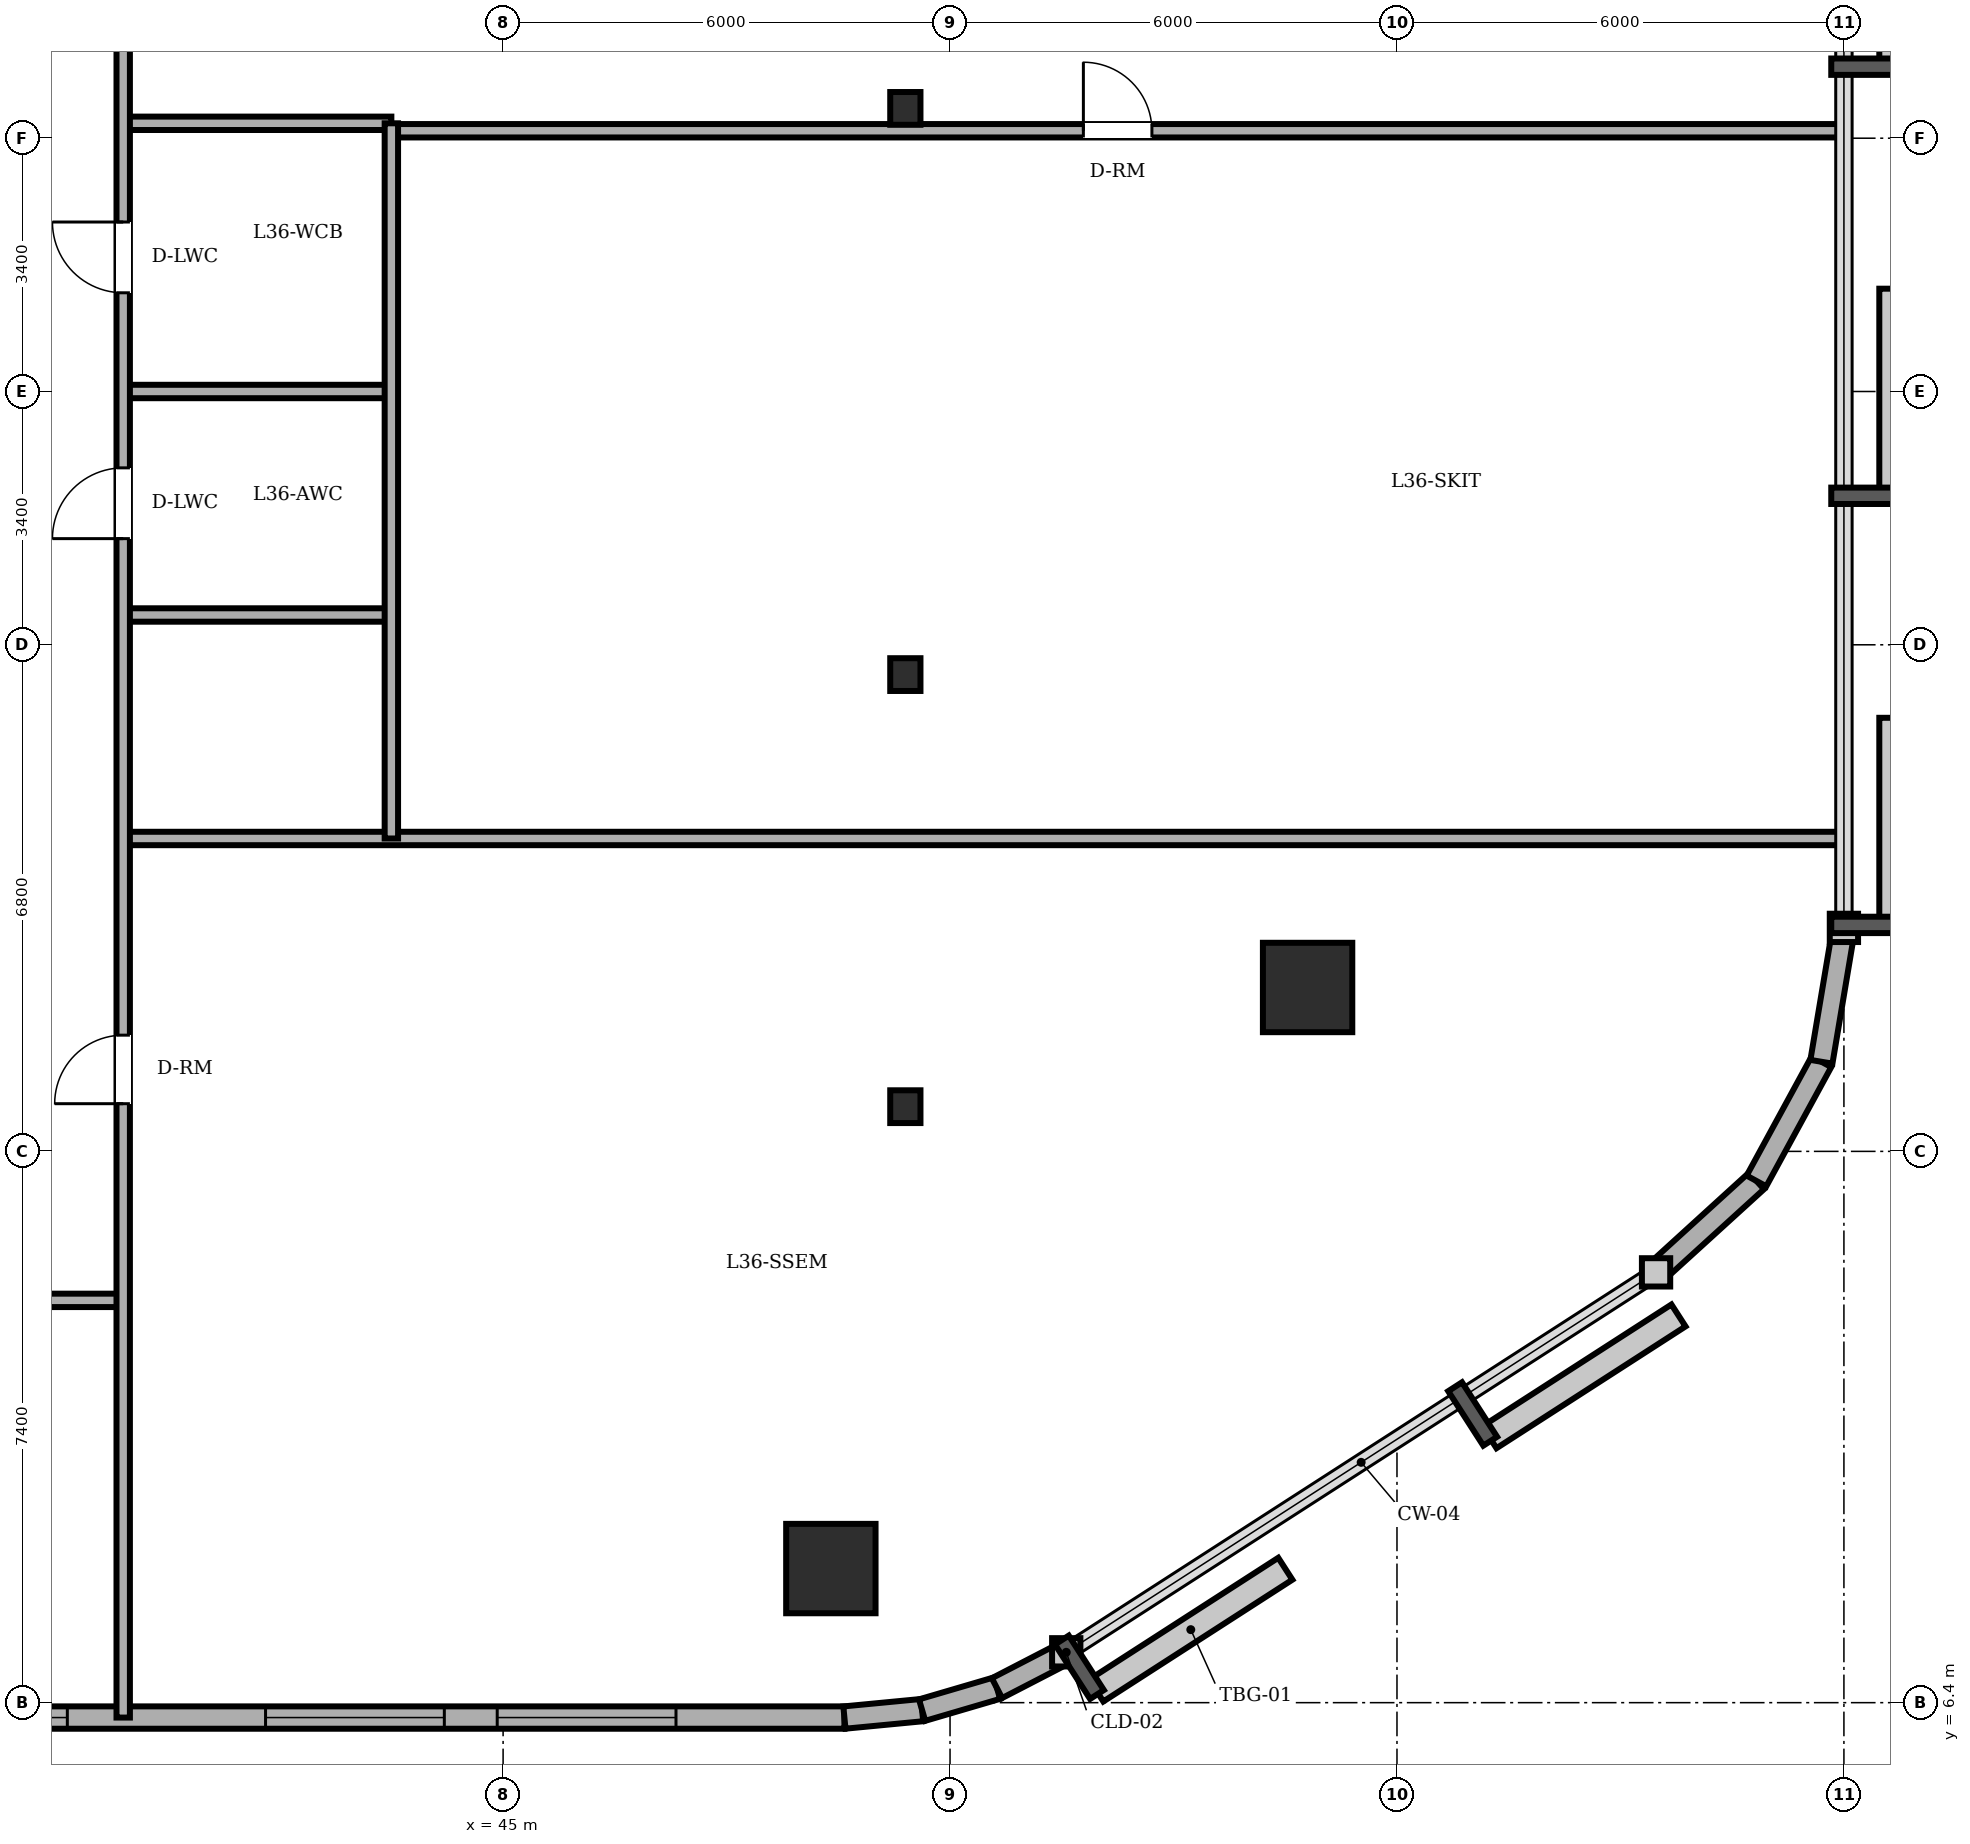
"""IFC4 building model, lengths in metres.
Left out: names, types, materials, properties, quantities, classifications, styles, units other than length and angle.
Written with IfcOpenShell. Run it as: python <this file> out.ifc"""

import sys

from ifc_helpers import new_model, si_unit, direction, frame, frame_2d, origin, origin_2d, place, context, subcontext, project, spatial, rectangle, circle, i_section, extrude, element, fill, save


model = new_model("IFC4")
c1 = context("Model", 3, precision=1e-05, world=origin(), true_north=direction((0.0, 1.0)))
c2 = subcontext(c1, "Body", "Model", "MODEL_VIEW")
j1 = project(units=[si_unit("LENGTHUNIT", "METRE"), si_unit("PLANEANGLEUNIT", "RADIAN")], contexts=[c1])
p1 = place(None, origin())
s1 = spatial("IfcSite", under=j1, at=p1, CompositionType="ELEMENT")
p2 = place(p1, origin())
s2 = spatial("IfcBuilding", under=s1, at=p2, CompositionType="ELEMENT")
p3 = place(p2, frame((0.0, 0.0, 138.7)))
s3 = spatial("IfcBuildingStorey", under=s2, at=p3, CompositionType="ELEMENT", Elevation=138.7)
for number, where, z_axis, x_axis in (
    (1, (49.4, 8.2, 0.0), (0.0, 0.0, 1.0), (1.0, 0.0, 0.0)),
    (2, (55.8, 16.0, 0.0), (0.0, 0.0, 1.0), (1.0, 0.0, 0.0)),
):
    element("IfcColumn", number, at=place(p3, frame(where, z_axis=z_axis, x_axis=x_axis)), inside=s3, PredefinedType="COLUMN", context=c2, shape_type="SweptSolid", body=[
        extrude(circle(Radius=0.6, at=origin_2d()), origin(), (0.0, 0.0, 1.0), 5.1),
    ])
for number, where, z_axis, x_axis in (
    (3, (50.4, 14.4, 0.0), (0.0, 0.0, 1.0), (1.0, 0.0, 0.0)),
    (4, (50.4, 20.2, 0.0), (0.0, 0.0, 1.0), (1.0, 0.0, 0.0)),
    (5, (50.4, 27.8, 0.0), (0.0, 0.0, 1.0), (1.0, 0.0, 0.0)),
):
    element("IfcColumn", number, at=place(p3, frame(where, z_axis=z_axis, x_axis=x_axis)), inside=s3, PredefinedType="COLUMN", context=c2, shape_type="SweptSolid", body=[
        extrude(i_section(OverallWidth=0.406, OverallDepth=0.44, WebThickness=0.024, FlangeThickness=0.039, FilletRadius=0.015, at=origin_2d()), origin(), (0.0, 0.0, 1.0), 5.1),
    ])
p4 = place(p3, frame((19.3, 6.2, 0.0), z_axis=(0.0, 0.0, 1.0), x_axis=(1.0, 0.0, 0.0)))
e6 = element("IfcWall", 6, at=p4, inside=s3, PredefinedType="SOLIDWALL", context=c2, shape_type="SweptSolid", body=[
    extrude(rectangle(XDim=30.282, YDim=0.3, at=frame_2d((15.141, 0.0))), origin(), (0.0, 0.0, 1.0), 4.9),
])
p5 = place(p4, frame((9.425, 0.0, 0.0)))
e7 = element("IfcOpeningElement", 7, at=p5, cuts=e6, PredefinedType="OPENING", context=c2, shape_type="SweptSolid", body=[
    extrude(rectangle(XDim=0.95, YDim=2.2, at=frame_2d((0.475, 1.1))), frame((0.0, 0.16, 0.0), z_axis=(0.0, -1.0, 0.0), x_axis=(1.0, 0.0, 0.0)), (0.0, 0.0, 1.0), 0.32),
])
p6 = place(p4, frame((0.825, 0.0, 0.85)))
e8 = element("IfcOpeningElement", 8, at=p6, cuts=e6, PredefinedType="OPENING", context=c2, shape_type="SweptSolid", body=[
    extrude(rectangle(XDim=2.4, YDim=2.1, at=frame_2d((1.2, 1.05))), frame((0.0, 0.16, 0.0), z_axis=(0.0, -1.0, 0.0), x_axis=(1.0, 0.0, 0.0)), (0.0, 0.0, 1.0), 0.32),
])
p7 = place(p4, frame((11.167, 0.0, 0.85)))
e9 = element("IfcOpeningElement", 9, at=p7, cuts=e6, PredefinedType="OPENING", context=c2, shape_type="SweptSolid", body=[
    extrude(rectangle(XDim=2.4, YDim=2.1, at=frame_2d((1.2, 1.05))), frame((0.0, 0.16, 0.0), z_axis=(0.0, -1.0, 0.0), x_axis=(1.0, 0.0, 0.0)), (0.0, 0.0, 1.0), 0.32),
])
p8 = place(p4, frame((17.45, 0.0, 0.85)))
e10 = element("IfcOpeningElement", 10, at=p8, cuts=e6, PredefinedType="OPENING", context=c2, shape_type="SweptSolid", body=[
    extrude(rectangle(XDim=2.4, YDim=2.1, at=frame_2d((1.2, 1.05))), frame((0.0, 0.16, 0.0), z_axis=(0.0, -1.0, 0.0), x_axis=(1.0, 0.0, 0.0)), (0.0, 0.0, 1.0), 0.32),
])
p9 = place(p4, frame((22.511, 0.0, 0.85)))
e11 = element("IfcOpeningElement", 11, at=p9, cuts=e6, PredefinedType="OPENING", context=c2, shape_type="SweptSolid", body=[
    extrude(rectangle(XDim=2.4, YDim=2.1, at=frame_2d((1.2, 1.05))), frame((0.0, 0.16, 0.0), z_axis=(0.0, -1.0, 0.0), x_axis=(1.0, 0.0, 0.0)), (0.0, 0.0, 1.0), 0.32),
])
p10 = place(p4, frame((25.621, 0.0, 0.85)))
e12 = element("IfcOpeningElement", 12, at=p10, cuts=e6, PredefinedType="OPENING", context=c2, shape_type="SweptSolid", body=[
    extrude(rectangle(XDim=2.4, YDim=2.1, at=frame_2d((1.2, 1.05))), frame((0.0, 0.16, 0.0), z_axis=(0.0, -1.0, 0.0), x_axis=(1.0, 0.0, 0.0)), (0.0, 0.0, 1.0), 0.32),
])
p11 = place(p3, frame((49.582, 6.2, 0.0), z_axis=(0.0, 0.0, 1.0), x_axis=(0.995426089968, 0.095534807324, 0.0)))
e13 = element("IfcWall", 13, at=p11, inside=s3, PredefinedType="SOLIDWALL", context=c2, shape_type="SweptSolid", body=[
    extrude(rectangle(XDim=1.048, YDim=0.3, at=frame_2d((0.524, 0.0))), origin(), (0.0, 0.0, 1.0), 4.9),
])
p12 = place(p3, frame((50.625, 6.3, 0.0), z_axis=(0.0, 0.0, 1.0), x_axis=(0.959528674476, 0.281610942363, 0.0)))
e14 = element("IfcWall", 14, at=p12, inside=s3, PredefinedType="SOLIDWALL", context=c2, shape_type="SweptSolid", body=[
    extrude(rectangle(XDim=1.047, YDim=0.3, at=frame_2d((0.524, 0.0))), origin(), (0.0, 0.0, 1.0), 4.9),
])
p13 = place(p3, frame((51.63, 6.595, 0.0), z_axis=(0.0, 0.0, 1.0), x_axis=(0.888283247196, 0.459296062198, 0.0)))
e15 = element("IfcWall", 15, at=p13, inside=s3, PredefinedType="SOLIDWALL", context=c2, shape_type="SweptSolid", body=[
    extrude(rectangle(XDim=1.047, YDim=0.3, at=frame_2d((0.523, 0.0))), origin(), (0.0, 0.0, 1.0), 4.9),
])
p14 = place(p3, frame((60.478, 12.176, 0.0), z_axis=(0.0, 0.0, 1.0), x_axis=(0.73947929393, 0.673179302897, 0.0)))
e16 = element("IfcWall", 16, at=p14, inside=s3, PredefinedType="SOLIDWALL", context=c2, shape_type="SweptSolid", body=[
    extrude(rectangle(XDim=1.823, YDim=0.3, at=frame_2d((0.911, 0.0))), origin(), (0.0, 0.0, 1.0), 4.9),
])
p15 = place(p3, frame((61.826, 13.403, 0.0), z_axis=(0.0, 0.0, 1.0), x_axis=(0.478608030646, 0.878028674362, 0.0)))
e17 = element("IfcWall", 17, at=p15, inside=s3, PredefinedType="SOLIDWALL", context=c2, shape_type="SweptSolid", body=[
    extrude(rectangle(XDim=1.822, YDim=0.3, at=frame_2d((0.911, 0.0))), origin(), (0.0, 0.0, 1.0), 4.9),
])
p16 = place(p3, frame((62.698, 15.003, 0.0), z_axis=(0.0, 0.0, 1.0), x_axis=(0.165724081207, 0.986172159873, 0.0)))
e18 = element("IfcWall", 18, at=p16, inside=s3, PredefinedType="SOLIDWALL", context=c2, shape_type="SweptSolid", body=[
    extrude(rectangle(XDim=1.822, YDim=0.3, at=frame_2d((0.911, 0.0))), origin(), (0.0, 0.0, 1.0), 4.9),
])
p17 = place(p3, frame((13.8, 11.8, 0.0), z_axis=(0.0, 0.0, 1.0), x_axis=(1.0, 0.0, 0.0)))
e19 = element("IfcWall", 19, at=p17, inside=s3, PredefinedType="PARTITIONING", context=c2, shape_type="SweptSolid", body=[
    extrude(rectangle(XDim=26.1, YDim=0.18, at=frame_2d((13.05, 0.0))), origin(), (0.0, 0.0, 1.0), 4.9),
])
p18 = place(p17, frame((15.25, 0.0, 0.0)))
e20 = element("IfcOpeningElement", 20, at=p18, cuts=e19, PredefinedType="OPENING", context=c2, shape_type="SweptSolid", body=[
    extrude(rectangle(XDim=0.9, YDim=2.05, at=frame_2d((0.45, 1.025))), frame((0.0, 0.1, 0.0), z_axis=(0.0, -1.0, 0.0), x_axis=(1.0, 0.0, 0.0)), (0.0, 0.0, 1.0), 0.2),
])
p19 = place(p3, frame((39.9, 18.0, 0.0), z_axis=(0.0, 0.0, 1.0), x_axis=(1.0, 0.0, 0.0)))
e21 = element("IfcWall", 21, at=p19, inside=s3, PredefinedType="PARTITIONING", context=c2, shape_type="SweptSolid", body=[
    extrude(rectangle(XDim=23.1, YDim=0.18, at=frame_2d((11.55, 0.0))), origin(), (0.0, 0.0, 1.0), 4.9),
])
p20 = place(p3, frame((39.9, 21.0, 0.0), z_axis=(0.0, 0.0, 1.0), x_axis=(1.0, 0.0, 0.0)))
e22 = element("IfcWall", 22, at=p20, inside=s3, PredefinedType="PARTITIONING", context=c2, shape_type="SweptSolid", body=[
    extrude(rectangle(XDim=3.6, YDim=0.18, at=frame_2d((1.8, 0.0))), origin(), (0.0, 0.0, 1.0), 4.9),
])
p21 = place(p3, frame((39.9, 24.0, 0.0), z_axis=(0.0, 0.0, 1.0), x_axis=(1.0, 0.0, 0.0)))
e23 = element("IfcWall", 23, at=p21, inside=s3, PredefinedType="PARTITIONING", context=c2, shape_type="SweptSolid", body=[
    extrude(rectangle(XDim=3.6, YDim=0.18, at=frame_2d((1.8, 0.0))), origin(), (0.0, 0.0, 1.0), 4.642),
])
p22 = place(p3, frame((43.5, 27.5, 0.0), z_axis=(0.0, 0.0, 1.0), x_axis=(1.0, 0.0, 0.0)))
e24 = element("IfcWall", 24, at=p22, inside=s3, PredefinedType="PARTITIONING", context=c2, shape_type="SweptSolid", body=[
    extrude(rectangle(XDim=19.5, YDim=0.18, at=frame_2d((9.75, 0.0))), origin(), (0.0, 0.0, 1.0), 4.432),
])
p23 = place(p22, frame((9.29, 0.0, 0.0)))
e25 = element("IfcOpeningElement", 25, at=p23, cuts=e24, PredefinedType="OPENING", context=c2, shape_type="SweptSolid", body=[
    extrude(rectangle(XDim=0.92, YDim=2.1, at=frame_2d((0.46, 1.05))), frame((0.0, 0.1, 0.0), z_axis=(0.0, -1.0, 0.0), x_axis=(1.0, 0.0, 0.0)), (0.0, 0.0, 1.0), 0.2),
])
p24 = place(p3, frame((39.9, 27.6, 0.0), z_axis=(0.0, 0.0, 1.0), x_axis=(1.0, 0.0, 0.0)))
e26 = element("IfcWall", 26, at=p24, inside=s3, PredefinedType="PARTITIONING", context=c2, shape_type="SweptSolid", body=[
    extrude(rectangle(XDim=3.6, YDim=0.18, at=frame_2d((1.8, 0.0))), origin(), (0.0, 0.0, 1.0), 4.432),
])
p25 = place(p3, frame((39.9, 6.2, 0.0), z_axis=(0.0, 0.0, 1.0), x_axis=(0.0, 1.0, 0.0)))
e27 = element("IfcWall", 27, at=p25, inside=s3, PredefinedType="PARTITIONING", context=c2, shape_type="SweptSolid", body=[
    extrude(rectangle(XDim=35.6, YDim=0.18, at=frame_2d((17.8, 0.0))), origin(), (0.0, 0.0, 1.0), 4.9),
])
p26 = place(p25, frame((15.825, 0.0, 0.0)))
e28 = element("IfcOpeningElement", 28, at=p26, cuts=e27, PredefinedType="OPENING", context=c2, shape_type="SweptSolid", body=[
    extrude(rectangle(XDim=0.95, YDim=2.15, at=frame_2d((0.475, 1.075))), frame((0.0, 0.1, 0.0), z_axis=(0.0, -1.0, 0.0), x_axis=(1.0, 0.0, 0.0)), (0.0, 0.0, 1.0), 0.2),
])
p27 = place(p25, frame((19.125, 0.0, 0.0)))
e29 = element("IfcOpeningElement", 29, at=p27, cuts=e27, PredefinedType="OPENING", context=c2, shape_type="SweptSolid", body=[
    extrude(rectangle(XDim=0.95, YDim=2.15, at=frame_2d((0.475, 1.075))), frame((0.0, 0.1, 0.0), z_axis=(0.0, -1.0, 0.0), x_axis=(1.0, 0.0, 0.0)), (0.0, 0.0, 1.0), 0.2),
])
p28 = place(p25, frame((25.24, 0.0, 0.0)))
e30 = element("IfcOpeningElement", 30, at=p28, cuts=e27, PredefinedType="OPENING", context=c2, shape_type="SweptSolid", body=[
    extrude(rectangle(XDim=0.92, YDim=2.1, at=frame_2d((0.46, 1.05))), frame((0.0, 0.1, 0.0), z_axis=(0.0, -1.0, 0.0), x_axis=(1.0, 0.0, 0.0)), (0.0, 0.0, 1.0), 0.2),
])
p29 = place(p25, frame((8.24, 0.0, 0.0)))
e31 = element("IfcOpeningElement", 31, at=p29, cuts=e27, PredefinedType="OPENING", context=c2, shape_type="SweptSolid", body=[
    extrude(rectangle(XDim=0.92, YDim=2.1, at=frame_2d((0.46, 1.05))), frame((0.0, 0.1, 0.0), z_axis=(0.0, -1.0, 0.0), x_axis=(1.0, 0.0, 0.0)), (0.0, 0.0, 1.0), 0.2),
])
p30 = place(p3, frame((43.5, 18.0, 0.0), z_axis=(0.0, 0.0, 1.0), x_axis=(0.0, 1.0, 0.0)))
e32 = element("IfcWall", 32, at=p30, inside=s3, PredefinedType="PARTITIONING", context=c2, shape_type="SweptSolid", body=[
    extrude(rectangle(XDim=9.6, YDim=0.18, at=frame_2d((4.8, 0.0))), origin(), (0.0, 0.0, 1.0), 4.9),
])
p31 = place(p8, origin())
e33 = element("IfcWindow", 33, at=p31, inside=s3, PartitioningType="TRIPLE_PANEL_VERTICAL", PredefinedType="WINDOW", context=c2, shape_type="SweptSolid", body=[
    extrude(rectangle(XDim=2.4, YDim=2.1, at=frame_2d((1.2, 1.05))), frame((0.0, 0.03, 0.0), z_axis=(0.0, -1.0, 0.0), x_axis=(1.0, 0.0, 0.0)), (0.0, 0.0, 1.0), 0.06),
])
fill(e10, e33)
p32 = place(p9, origin())
e34 = element("IfcWindow", 34, at=p32, inside=s3, PartitioningType="TRIPLE_PANEL_VERTICAL", PredefinedType="WINDOW", context=c2, shape_type="SweptSolid", body=[
    extrude(rectangle(XDim=2.4, YDim=2.1, at=frame_2d((1.2, 1.05))), frame((0.0, 0.03, 0.0), z_axis=(0.0, -1.0, 0.0), x_axis=(1.0, 0.0, 0.0)), (0.0, 0.0, 1.0), 0.06),
])
fill(e11, e34)
p33 = place(p10, origin())
e35 = element("IfcWindow", 35, at=p33, inside=s3, PartitioningType="TRIPLE_PANEL_VERTICAL", PredefinedType="WINDOW", context=c2, shape_type="SweptSolid", body=[
    extrude(rectangle(XDim=2.4, YDim=2.1, at=frame_2d((1.2, 1.05))), frame((0.0, 0.03, 0.0), z_axis=(0.0, -1.0, 0.0), x_axis=(1.0, 0.0, 0.0)), (0.0, 0.0, 1.0), 0.06),
])
fill(e12, e35)
p34 = place(p26, origin())
e36 = element("IfcDoor", 36, at=p34, inside=s3, OperationType="SINGLE_SWING_LEFT", PredefinedType="DOOR", context=c2, shape_type="SweptSolid", body=[
    extrude(rectangle(XDim=0.95, YDim=2.15, at=frame_2d((0.475, 1.075))), frame((0.0, 0.025, 0.0), z_axis=(0.0, -1.0, 0.0), x_axis=(1.0, 0.0, 0.0)), (0.0, 0.0, 1.0), 0.05),
])
fill(e28, e36)
p35 = place(p27, origin())
e37 = element("IfcDoor", 37, at=p35, inside=s3, OperationType="SINGLE_SWING_RIGHT", PredefinedType="DOOR", context=c2, shape_type="SweptSolid", body=[
    extrude(rectangle(XDim=0.95, YDim=2.15, at=frame_2d((0.475, 1.075))), frame((0.0, 0.025, 0.0), z_axis=(0.0, -1.0, 0.0), x_axis=(1.0, 0.0, 0.0)), (0.0, 0.0, 1.0), 0.05),
])
fill(e29, e37)
p36 = place(p29, origin())
e38 = element("IfcDoor", 38, at=p36, inside=s3, OperationType="SINGLE_SWING_LEFT", PredefinedType="DOOR", context=c2, shape_type="SweptSolid", body=[
    extrude(rectangle(XDim=0.92, YDim=2.1, at=frame_2d((0.46, 1.05))), frame((0.0, 0.025, 0.0), z_axis=(0.0, -1.0, 0.0), x_axis=(1.0, 0.0, 0.0)), (0.0, 0.0, 1.0), 0.05),
])
fill(e31, e38)
p37 = place(p23, origin())
e39 = element("IfcDoor", 39, at=p37, inside=s3, OperationType="SINGLE_SWING_LEFT", PredefinedType="DOOR", context=c2, shape_type="SweptSolid", body=[
    extrude(rectangle(XDim=0.92, YDim=2.1, at=frame_2d((0.46, 1.05))), frame((0.0, 0.025, 0.0), z_axis=(0.0, -1.0, 0.0), x_axis=(1.0, 0.0, 0.0)), (0.0, 0.0, 1.0), 0.05),
])
fill(e25, e39)
save(model, sys.argv[1])
